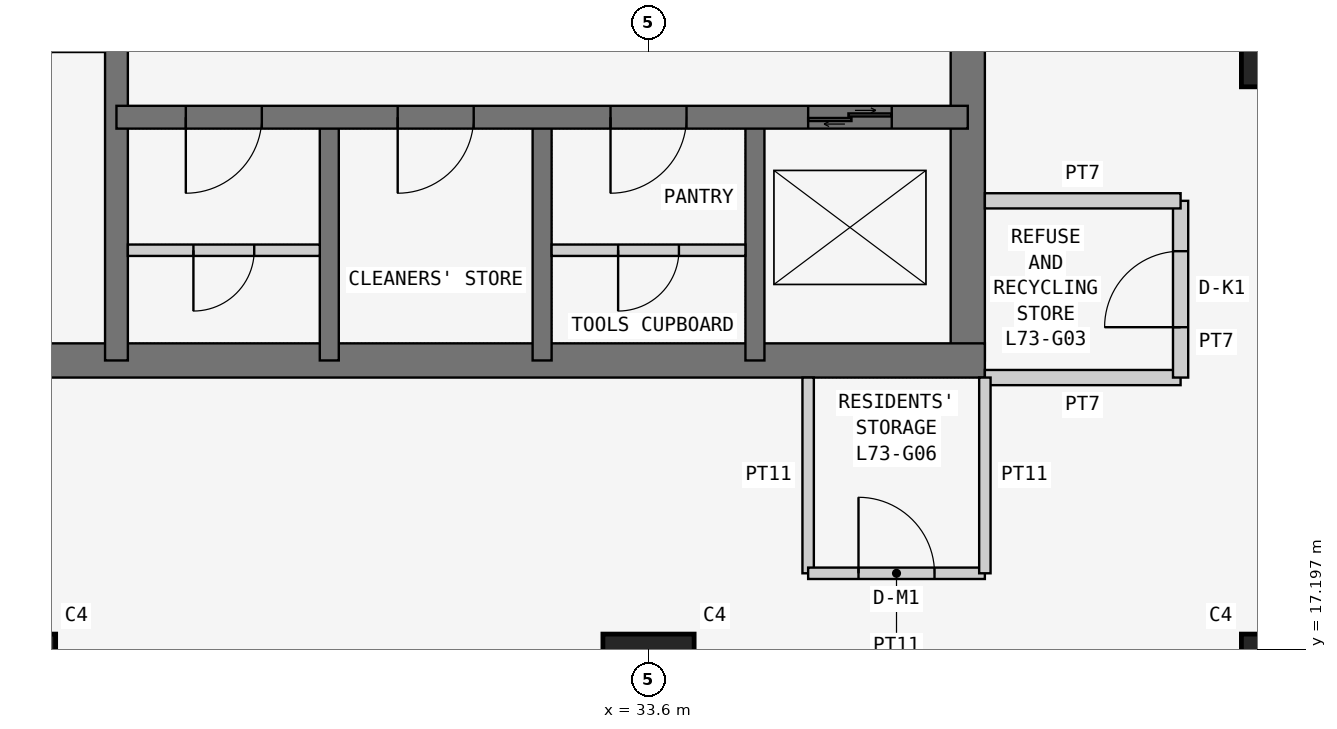
"""IFC4 building model, lengths in metres.
Left out: names, types, materials, properties, quantities, classifications, styles, units other than length and angle.
Written with IfcOpenShell. Run it as: python <this file> out.ifc"""

import sys

from ifc_helpers import new_model, si_unit, direction, frame, frame_2d, origin, origin_2d, place, context, subcontext, project, spatial, rectangle, extrude, element, fill, save


model = new_model("IFC4")
c1 = context("Model", 3, precision=1e-05, world=origin(), true_north=direction((0.0, 1.0)))
c2 = subcontext(c1, "Body", "Model", "MODEL_VIEW")
j1 = project(units=[si_unit("LENGTHUNIT", "METRE"), si_unit("PLANEANGLEUNIT", "RADIAN")], contexts=[c1])
p1 = place(None, origin())
s1 = spatial("IfcSite", under=j1, at=p1, CompositionType="ELEMENT")
p2 = place(p1, origin())
s2 = spatial("IfcBuilding", under=s1, at=p2, CompositionType="ELEMENT")
p3 = place(p2, frame((0.0, 0.0, 279.3)))
s3 = spatial("IfcBuildingStorey", under=s2, at=p3, CompositionType="ELEMENT", Elevation=279.3)
for number, where, z_axis, x_axis in (
    (1, (25.2, 16.8, 0.0), (0.0, 0.0, 1.0), (1.0, 0.0, 0.0)),
    (2, (33.6, 16.8, 0.0), (0.0, 0.0, 1.0), (1.0, 0.0, 0.0)),
    (3, (42.0, 16.8, 0.0), (0.0, 0.0, 1.0), (1.0, 0.0, 0.0)),
    (4, (42.0, 25.2, 0.0), (0.0, 0.0, 1.0), (1.0, 0.0, 0.0)),
):
    element("IfcColumn", number, at=place(p3, frame(where, z_axis=z_axis, x_axis=x_axis)), inside=s3, PredefinedType="COLUMN", context=c2, shape_type="SweptSolid", body=[
        extrude(rectangle(XDim=1.2, YDim=1.2, at=origin_2d()), origin(), (0.0, 0.0, 1.0), 3.6),
    ])
p4 = place(p3, frame((21.0, 21.0, 0.0), z_axis=(0.0, 0.0, 1.0), x_axis=(1.0, 0.0, 0.0)))
e5 = element("IfcWall", 5, at=p4, inside=s3, PredefinedType="SHEAR", context=c2, shape_type="SweptSolid", body=[
    extrude(rectangle(XDim=17.025, YDim=0.45, at=frame_2d((8.512, 0.0))), origin(), (0.0, 0.0, 1.0), 3.6),
])
p5 = place(p3, frame((37.8, 21.0, 0.0), z_axis=(0.0, 0.0, 1.0), x_axis=(0.0, 1.0, 0.0)))
e6 = element("IfcWall", 6, at=p5, inside=s3, PredefinedType="SHEAR", context=c2, shape_type="SweptSolid", body=[
    extrude(rectangle(XDim=17.025, YDim=0.45, at=frame_2d((8.512, 0.0))), origin(), (0.0, 0.0, 1.0), 3.6),
])
p6 = place(p5, frame((5.2, 0.0, 0.0)))
e7 = element("IfcOpeningElement", 7, at=p6, cuts=e6, PredefinedType="OPENING", context=c2, shape_type="SweptSolid", body=[
    extrude(rectangle(XDim=1.2, YDim=2.1, at=frame_2d((0.6, 1.05))), frame((0.0, 0.235, 0.0), z_axis=(0.0, -1.0, 0.0), x_axis=(1.0, 0.0, 0.0)), (0.0, 0.0, 1.0), 0.47),
])
p7 = place(p3, frame((26.6, 21.0, 0.0), z_axis=(0.0, 0.0, 1.0), x_axis=(0.0, 1.0, 0.0)))
e8 = element("IfcWall", 8, at=p7, inside=s3, PredefinedType="SHEAR", context=c2, shape_type="SweptSolid", body=[
    extrude(rectangle(XDim=16.8, YDim=0.3, at=frame_2d((8.4, 0.0))), origin(), (0.0, 0.0, 1.0), 3.6),
])
p8 = place(p7, frame((10.4, 0.0, 0.0)))
e9 = element("IfcOpeningElement", 9, at=p8, cuts=e8, PredefinedType="OPENING", context=c2, shape_type="SweptSolid", body=[
    extrude(rectangle(XDim=1.2, YDim=2.1, at=frame_2d((0.6, 1.05))), frame((0.0, 0.16, 0.0), z_axis=(0.0, -1.0, 0.0), x_axis=(1.0, 0.0, 0.0)), (0.0, 0.0, 1.0), 0.32),
])
p9 = place(p3, frame((26.6, 24.2, 0.0), z_axis=(0.0, 0.0, 1.0), x_axis=(1.0, 0.0, 0.0)))
e10 = element("IfcWall", 10, at=p9, inside=s3, PredefinedType="SHEAR", context=c2, shape_type="SweptSolid", body=[
    extrude(rectangle(XDim=11.2, YDim=0.3, at=frame_2d((5.6, 0.0))), origin(), (0.0, 0.0, 1.0), 3.6),
])
p10 = place(p9, frame((0.913, 0.0, 0.0)))
e11 = element("IfcOpeningElement", 11, at=p10, cuts=e10, PredefinedType="OPENING", context=c2, shape_type="SweptSolid", body=[
    extrude(rectangle(XDim=1.0, YDim=2.1, at=frame_2d((0.5, 1.05))), frame((0.0, 0.16, 0.0), z_axis=(0.0, -1.0, 0.0), x_axis=(1.0, 0.0, 0.0)), (0.0, 0.0, 1.0), 0.32),
])
p11 = place(p9, frame((3.7, 0.0, 0.0)))
e12 = element("IfcOpeningElement", 12, at=p11, cuts=e10, PredefinedType="OPENING", context=c2, shape_type="SweptSolid", body=[
    extrude(rectangle(XDim=1.0, YDim=2.1, at=frame_2d((0.5, 1.05))), frame((0.0, 0.16, 0.0), z_axis=(0.0, -1.0, 0.0), x_axis=(1.0, 0.0, 0.0)), (0.0, 0.0, 1.0), 0.32),
])
p12 = place(p9, frame((6.5, 0.0, 0.0)))
e13 = element("IfcOpeningElement", 13, at=p12, cuts=e10, PredefinedType="OPENING", context=c2, shape_type="SweptSolid", body=[
    extrude(rectangle(XDim=1.0, YDim=2.1, at=frame_2d((0.5, 1.05))), frame((0.0, 0.16, 0.0), z_axis=(0.0, -1.0, 0.0), x_axis=(1.0, 0.0, 0.0)), (0.0, 0.0, 1.0), 0.32),
])
p13 = place(p9, frame((9.1, 0.0, 0.0)))
e14 = element("IfcOpeningElement", 14, at=p13, cuts=e10, PredefinedType="OPENING", context=c2, shape_type="SweptSolid", body=[
    extrude(rectangle(XDim=1.1, YDim=2.1, at=frame_2d((0.55, 1.05))), frame((0.0, 0.16, 0.0), z_axis=(0.0, -1.0, 0.0), x_axis=(1.0, 0.0, 0.0)), (0.0, 0.0, 1.0), 0.32),
])
for number, where, z_axis, x_axis in (
    (15, (29.4, 21.0, 0.0), (0.0, 0.0, 1.0), (0.0, 1.0, 0.0)),
    (16, (32.2, 21.0, 0.0), (0.0, 0.0, 1.0), (0.0, 1.0, 0.0)),
    (17, (35.0, 21.0, 0.0), (0.0, 0.0, 1.0), (0.0, 1.0, 0.0)),
):
    element("IfcWall", number, at=place(p3, frame(where, z_axis=z_axis, x_axis=x_axis)), inside=s3, PredefinedType="SHEAR", context=c2, shape_type="SweptSolid", body=[
        extrude(rectangle(XDim=3.2, YDim=0.25, at=frame_2d((1.6, 0.0))), origin(), (0.0, 0.0, 1.0), 3.6),
    ])
p14 = place(p3, frame((38.025, 20.775, 0.0), z_axis=(0.0, 0.0, 1.0), x_axis=(1.0, 0.0, 0.0)))
e18 = element("IfcWall", 18, at=p14, inside=s3, PredefinedType="PARTITIONING", context=c2, shape_type="SweptSolid", body=[
    extrude(rectangle(XDim=2.575, YDim=0.2, at=frame_2d((1.288, 0.0))), origin(), (0.0, 0.0, 1.0), 3.45),
])
p15 = place(p3, frame((40.6, 20.775, 0.0), z_axis=(0.0, 0.0, 1.0), x_axis=(0.0, 1.0, 0.0)))
e19 = element("IfcWall", 19, at=p15, inside=s3, PredefinedType="PARTITIONING", context=c2, shape_type="SweptSolid", body=[
    extrude(rectangle(XDim=2.325, YDim=0.2, at=frame_2d((1.163, 0.0))), origin(), (0.0, 0.0, 1.0), 3.45),
])
p16 = place(p15, frame((0.663, 0.0, 0.0)))
e20 = element("IfcOpeningElement", 20, at=p16, cuts=e19, PredefinedType="OPENING", context=c2, shape_type="SweptSolid", body=[
    extrude(rectangle(XDim=1.0, YDim=2.1, at=frame_2d((0.5, 1.05))), frame((0.0, 0.11, 0.0), z_axis=(0.0, -1.0, 0.0), x_axis=(1.0, 0.0, 0.0)), (0.0, 0.0, 1.0), 0.22),
])
p17 = place(p3, frame((40.6, 23.1, 0.0), z_axis=(0.0, 0.0, 1.0), x_axis=(-1.0, 0.0, 0.0)))
e21 = element("IfcWall", 21, at=p17, inside=s3, PredefinedType="PARTITIONING", context=c2, shape_type="SweptSolid", body=[
    extrude(rectangle(XDim=2.575, YDim=0.2, at=frame_2d((1.288, 0.0))), origin(), (0.0, 0.0, 1.0), 3.45),
])
p18 = place(p3, frame((35.7, 20.775, 0.0), z_axis=(0.0, 0.0, 1.0), x_axis=(0.0, -1.0, 0.0)))
e22 = element("IfcWall", 22, at=p18, inside=s3, PredefinedType="PARTITIONING", context=c2, shape_type="SweptSolid", body=[
    extrude(rectangle(XDim=2.575, YDim=0.15, at=frame_2d((1.288, 0.0))), origin(), (0.0, 0.0, 1.0), 3.45),
])
p19 = place(p3, frame((35.7, 18.2, 0.0), z_axis=(0.0, 0.0, 1.0), x_axis=(1.0, 0.0, 0.0)))
e23 = element("IfcWall", 23, at=p19, inside=s3, PredefinedType="PARTITIONING", context=c2, shape_type="SweptSolid", body=[
    extrude(rectangle(XDim=2.325, YDim=0.15, at=frame_2d((1.163, 0.0))), origin(), (0.0, 0.0, 1.0), 3.45),
])
p20 = place(p19, frame((0.663, 0.0, 0.0)))
e24 = element("IfcOpeningElement", 24, at=p20, cuts=e23, PredefinedType="OPENING", context=c2, shape_type="SweptSolid", body=[
    extrude(rectangle(XDim=1.0, YDim=2.1, at=frame_2d((0.5, 1.05))), frame((0.0, 0.085, 0.0), z_axis=(0.0, -1.0, 0.0), x_axis=(1.0, 0.0, 0.0)), (0.0, 0.0, 1.0), 0.17),
])
p21 = place(p3, frame((38.025, 18.2, 0.0), z_axis=(0.0, 0.0, 1.0), x_axis=(0.0, 1.0, 0.0)))
e25 = element("IfcWall", 25, at=p21, inside=s3, PredefinedType="PARTITIONING", context=c2, shape_type="SweptSolid", body=[
    extrude(rectangle(XDim=2.575, YDim=0.15, at=frame_2d((1.288, 0.0))), origin(), (0.0, 0.0, 1.0), 3.45),
])
p22 = place(p3, frame((26.75, 22.45, 0.0), z_axis=(0.0, 0.0, 1.0), x_axis=(1.0, 0.0, 0.0)))
e26 = element("IfcWall", 26, at=p22, inside=s3, PredefinedType="PARTITIONING", context=c2, shape_type="SweptSolid", body=[
    extrude(rectangle(XDim=2.525, YDim=0.15, at=frame_2d((1.262, 0.0))), origin(), (0.0, 0.0, 1.0), 3.45),
])
p23 = place(p22, frame((0.863, 0.0, 0.0)))
e27 = element("IfcOpeningElement", 27, at=p23, cuts=e26, PredefinedType="OPENING", context=c2, shape_type="SweptSolid", body=[
    extrude(rectangle(XDim=0.8, YDim=2.1, at=frame_2d((0.4, 1.05))), frame((0.0, 0.085, 0.0), z_axis=(0.0, -1.0, 0.0), x_axis=(1.0, 0.0, 0.0)), (0.0, 0.0, 1.0), 0.17),
])
p24 = place(p3, frame((32.325, 22.45, 0.0), z_axis=(0.0, 0.0, 1.0), x_axis=(1.0, 0.0, 0.0)))
e28 = element("IfcWall", 28, at=p24, inside=s3, PredefinedType="PARTITIONING", context=c2, shape_type="SweptSolid", body=[
    extrude(rectangle(XDim=2.55, YDim=0.15, at=frame_2d((1.275, 0.0))), origin(), (0.0, 0.0, 1.0), 3.45),
])
p25 = place(p24, frame((0.875, 0.0, 0.0)))
e29 = element("IfcOpeningElement", 29, at=p25, cuts=e28, PredefinedType="OPENING", context=c2, shape_type="SweptSolid", body=[
    extrude(rectangle(XDim=0.8, YDim=2.1, at=frame_2d((0.4, 1.05))), frame((0.0, 0.085, 0.0), z_axis=(0.0, -1.0, 0.0), x_axis=(1.0, 0.0, 0.0)), (0.0, 0.0, 1.0), 0.17),
])
p26 = place(p16, origin())
e30 = element("IfcDoor", 30, at=p26, inside=s3, OperationType="SINGLE_SWING_LEFT", PredefinedType="DOOR", context=c2, shape_type="SweptSolid", body=[
    extrude(rectangle(XDim=1.0, YDim=2.1, at=frame_2d((0.5, 1.05))), frame((0.0, 0.025, 0.0), z_axis=(0.0, -1.0, 0.0), x_axis=(1.0, 0.0, 0.0)), (0.0, 0.0, 1.0), 0.05),
])
fill(e20, e30)
p27 = place(p20, origin())
e31 = element("IfcDoor", 31, at=p27, inside=s3, OperationType="SINGLE_SWING_LEFT", PredefinedType="DOOR", context=c2, shape_type="SweptSolid", body=[
    extrude(rectangle(XDim=1.0, YDim=2.1, at=frame_2d((0.5, 1.05))), frame((0.0, 0.025, 0.0), z_axis=(0.0, -1.0, 0.0), x_axis=(1.0, 0.0, 0.0)), (0.0, 0.0, 1.0), 0.05),
])
fill(e24, e31)
p28 = place(p10, frame((1.0, 0.0, 0.0), z_axis=(0.0, 0.0, 1.0), x_axis=(-1.0, 0.0, 0.0)))
e32 = element("IfcDoor", 32, at=p28, inside=s3, OperationType="SINGLE_SWING_RIGHT", PredefinedType="DOOR", context=c2, shape_type="SweptSolid", body=[
    extrude(rectangle(XDim=1.0, YDim=2.1, at=frame_2d((0.5, 1.05))), frame((0.0, 0.025, 0.0), z_axis=(0.0, -1.0, 0.0), x_axis=(1.0, 0.0, 0.0)), (0.0, 0.0, 1.0), 0.05),
])
fill(e11, e32)
p29 = place(p23, frame((0.8, 0.0, 0.0), z_axis=(0.0, 0.0, 1.0), x_axis=(-1.0, 0.0, 0.0)))
e33 = element("IfcDoor", 33, at=p29, inside=s3, OperationType="SINGLE_SWING_RIGHT", PredefinedType="DOOR", context=c2, shape_type="SweptSolid", body=[
    extrude(rectangle(XDim=0.8, YDim=2.1, at=frame_2d((0.4, 1.05))), frame((0.0, 0.025, 0.0), z_axis=(0.0, -1.0, 0.0), x_axis=(1.0, 0.0, 0.0)), (0.0, 0.0, 1.0), 0.05),
])
fill(e27, e33)
p30 = place(p11, frame((1.0, 0.0, 0.0), z_axis=(0.0, 0.0, 1.0), x_axis=(-1.0, 0.0, 0.0)))
e34 = element("IfcDoor", 34, at=p30, inside=s3, OperationType="SINGLE_SWING_RIGHT", PredefinedType="DOOR", context=c2, shape_type="SweptSolid", body=[
    extrude(rectangle(XDim=1.0, YDim=2.1, at=frame_2d((0.5, 1.05))), frame((0.0, 0.025, 0.0), z_axis=(0.0, -1.0, 0.0), x_axis=(1.0, 0.0, 0.0)), (0.0, 0.0, 1.0), 0.05),
])
fill(e12, e34)
p31 = place(p12, frame((1.0, 0.0, 0.0), z_axis=(0.0, 0.0, 1.0), x_axis=(-1.0, 0.0, 0.0)))
e35 = element("IfcDoor", 35, at=p31, inside=s3, OperationType="SINGLE_SWING_RIGHT", PredefinedType="DOOR", context=c2, shape_type="SweptSolid", body=[
    extrude(rectangle(XDim=1.0, YDim=2.1, at=frame_2d((0.5, 1.05))), frame((0.0, 0.025, 0.0), z_axis=(0.0, -1.0, 0.0), x_axis=(1.0, 0.0, 0.0)), (0.0, 0.0, 1.0), 0.05),
])
fill(e13, e35)
p32 = place(p25, frame((0.8, 0.0, 0.0), z_axis=(0.0, 0.0, 1.0), x_axis=(-1.0, 0.0, 0.0)))
e36 = element("IfcDoor", 36, at=p32, inside=s3, OperationType="SINGLE_SWING_RIGHT", PredefinedType="DOOR", context=c2, shape_type="SweptSolid", body=[
    extrude(rectangle(XDim=0.8, YDim=2.1, at=frame_2d((0.4, 1.05))), frame((0.0, 0.025, 0.0), z_axis=(0.0, -1.0, 0.0), x_axis=(1.0, 0.0, 0.0)), (0.0, 0.0, 1.0), 0.05),
])
fill(e29, e36)
p33 = place(p13, origin())
e37 = element("IfcDoor", 37, at=p33, inside=s3, OperationType="DOUBLE_DOOR_SLIDING", PredefinedType="DOOR", context=c2, shape_type="SweptSolid", body=[
    extrude(rectangle(XDim=1.1, YDim=2.1, at=frame_2d((0.55, 1.05))), frame((0.0, 0.025, 0.0), z_axis=(0.0, -1.0, 0.0), x_axis=(1.0, 0.0, 0.0)), (0.0, 0.0, 1.0), 0.05),
])
fill(e14, e37)
save(model, sys.argv[1])
